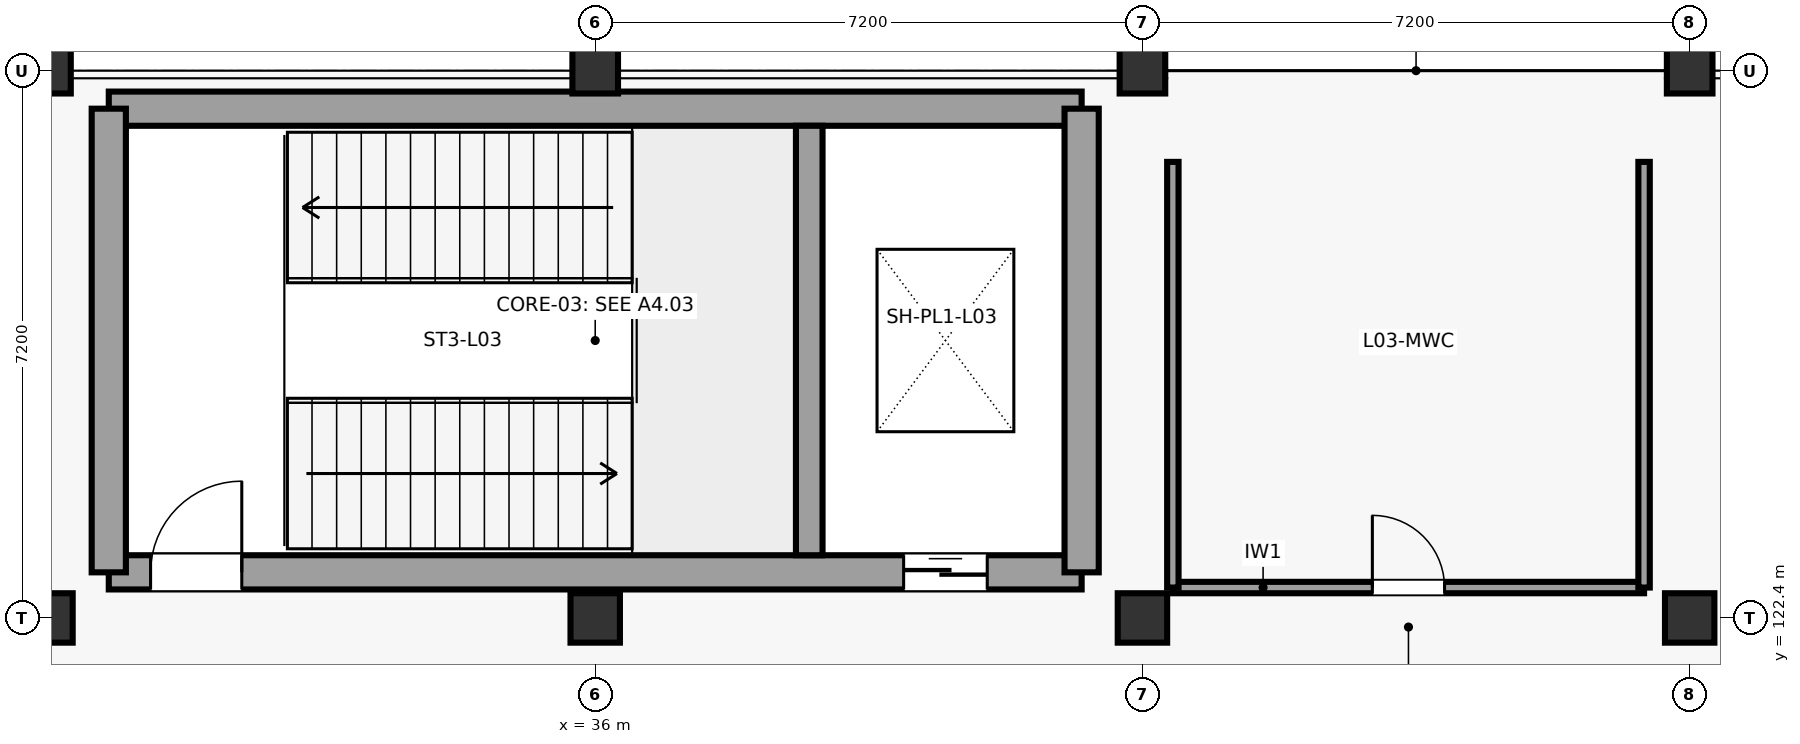
"""IFC4 building model, lengths in metres.
Left out: names, types, materials, properties, quantities, classifications, styles, units other than length and angle.
Written with IfcOpenShell. Run it as: python <this file> out.ifc"""

import sys

from ifc_helpers import new_model, si_unit, direction, frame, frame_2d, origin, origin_2d, place, context, subcontext, project, spatial, rectangle, extrude, element, fill, save


model = new_model("IFC4")
c1 = context("Model", 3, precision=1e-05, world=origin(), true_north=direction((0.0, 1.0)))
c2 = subcontext(c1, "Body", "Model", "MODEL_VIEW")
j1 = project(units=[si_unit("LENGTHUNIT", "METRE"), si_unit("PLANEANGLEUNIT", "RADIAN")], contexts=[c1])
p1 = place(None, origin())
s1 = spatial("IfcSite", under=j1, at=p1, CompositionType="ELEMENT")
p2 = place(p1, origin())
s2 = spatial("IfcBuilding", under=s1, at=p2, CompositionType="ELEMENT")
p3 = place(p2, frame((0.0, 0.0, 13.8)))
s3 = spatial("IfcBuildingStorey", under=s2, at=p3, CompositionType="ELEMENT", Elevation=13.8)
p4 = place(p3, frame((28.8, 122.4, 0.0), z_axis=(0.0, 0.0, 1.0), x_axis=(1.0, 0.0, 0.0)))
e1 = element("IfcColumn", 1, at=p4, inside=s3, PredefinedType="COLUMN", context=c2, shape_type="SweptSolid", body=[
    extrude(rectangle(XDim=0.65, YDim=0.65, at=origin_2d()), origin(), (0.0, 0.0, 1.0), 4.8),
])
p5 = place(p3, frame((28.8, 129.6, 0.0), z_axis=(0.0, 0.0, 1.0), x_axis=(1.0, 0.0, 0.0)))
e2 = element("IfcColumn", 2, at=p5, inside=s3, PredefinedType="COLUMN", context=c2, shape_type="SweptSolid", body=[
    extrude(rectangle(XDim=0.6, YDim=0.6, at=origin_2d()), origin(), (0.0, 0.0, 1.0), 4.8),
])
p6 = place(p3, frame((36.0, 122.4, 0.0), z_axis=(0.0, 0.0, 1.0), x_axis=(1.0, 0.0, 0.0)))
e3 = element("IfcColumn", 3, at=p6, inside=s3, PredefinedType="COLUMN", context=c2, shape_type="SweptSolid", body=[
    extrude(rectangle(XDim=0.65, YDim=0.65, at=origin_2d()), origin(), (0.0, 0.0, 1.0), 4.8),
])
p7 = place(p3, frame((36.0, 129.6, 0.0), z_axis=(0.0, 0.0, 1.0), x_axis=(1.0, 0.0, 0.0)))
e4 = element("IfcColumn", 4, at=p7, inside=s3, PredefinedType="COLUMN", context=c2, shape_type="SweptSolid", body=[
    extrude(rectangle(XDim=0.6, YDim=0.6, at=origin_2d()), origin(), (0.0, 0.0, 1.0), 4.8),
])
p8 = place(p3, frame((43.2, 122.4, 0.0), z_axis=(0.0, 0.0, 1.0), x_axis=(1.0, 0.0, 0.0)))
e5 = element("IfcColumn", 5, at=p8, inside=s3, PredefinedType="COLUMN", context=c2, shape_type="SweptSolid", body=[
    extrude(rectangle(XDim=0.65, YDim=0.65, at=origin_2d()), origin(), (0.0, 0.0, 1.0), 4.8),
])
p9 = place(p3, frame((43.2, 129.6, 0.0), z_axis=(0.0, 0.0, 1.0), x_axis=(1.0, 0.0, 0.0)))
e6 = element("IfcColumn", 6, at=p9, inside=s3, PredefinedType="COLUMN", context=c2, shape_type="SweptSolid", body=[
    extrude(rectangle(XDim=0.6, YDim=0.6, at=origin_2d()), origin(), (0.0, 0.0, 1.0), 4.8),
])
p10 = place(p3, frame((50.4, 122.4, 0.0), z_axis=(0.0, 0.0, 1.0), x_axis=(1.0, 0.0, 0.0)))
e7 = element("IfcColumn", 7, at=p10, inside=s3, PredefinedType="COLUMN", context=c2, shape_type="SweptSolid", body=[
    extrude(rectangle(XDim=0.65, YDim=0.65, at=origin_2d()), origin(), (0.0, 0.0, 1.0), 4.8),
])
p11 = place(p3, frame((50.4, 129.6, 0.0), z_axis=(0.0, 0.0, 1.0), x_axis=(1.0, 0.0, 0.0)))
e8 = element("IfcColumn", 8, at=p11, inside=s3, PredefinedType="COLUMN", context=c2, shape_type="SweptSolid", body=[
    extrude(rectangle(XDim=0.6, YDim=0.6, at=origin_2d()), origin(), (0.0, 0.0, 1.0), 4.8),
])
p12 = place(p3, frame((29.6, 123.0, 0.0), z_axis=(0.0, 0.0, 1.0), x_axis=(1.0, 0.0, 0.0)))
e9 = element("IfcWall", 9, at=p12, inside=s3, PredefinedType="SHEAR", context=c2, shape_type="SweptSolid", body=[
    extrude(rectangle(XDim=12.8, YDim=0.45, at=frame_2d((6.4, 0.0))), origin(), (0.0, 0.0, 1.0), 4.53),
])
p13 = place(p12, frame((0.55, 0.0, 0.0)))
e10 = element("IfcOpeningElement", 10, at=p13, cuts=e9, PredefinedType="OPENING", context=c2, shape_type="SweptSolid", body=[
    extrude(rectangle(XDim=1.2, YDim=2.25, at=frame_2d((0.6, 1.125))), frame((0.0, 0.235, 0.0), z_axis=(0.0, -1.0, 0.0), x_axis=(1.0, 0.0, 0.0)), (0.0, 0.0, 1.0), 0.47),
])
p14 = place(p12, frame((10.458, 0.0, 0.0)))
e11 = element("IfcOpeningElement", 11, at=p14, cuts=e9, PredefinedType="OPENING", context=c2, shape_type="SweptSolid", body=[
    extrude(rectangle(XDim=1.1, YDim=2.2, at=frame_2d((0.55, 1.1))), frame((0.0, 0.235, 0.0), z_axis=(0.0, -1.0, 0.0), x_axis=(1.0, 0.0, 0.0)), (0.0, 0.0, 1.0), 0.47),
])
p15 = place(p3, frame((29.6, 129.1, 0.0), z_axis=(0.0, 0.0, 1.0), x_axis=(1.0, 0.0, 0.0)))
e12 = element("IfcWall", 12, at=p15, inside=s3, PredefinedType="SHEAR", context=c2, shape_type="SweptSolid", body=[
    extrude(rectangle(XDim=12.8, YDim=0.45, at=frame_2d((6.4, 0.0))), origin(), (0.0, 0.0, 1.0), 4.53),
])
for number, where, z_axis, x_axis in (
    (13, (29.6, 123.0, 0.0), (0.0, 0.0, 1.0), (0.0, 1.0, 0.0)),
    (14, (42.4, 123.0, 0.0), (0.0, 0.0, 1.0), (0.0, 1.0, 0.0)),
):
    element("IfcWall", number, at=place(p3, frame(where, z_axis=z_axis, x_axis=x_axis)), inside=s3, PredefinedType="SHEAR", context=c2, shape_type="SweptSolid", body=[
        extrude(rectangle(XDim=6.1, YDim=0.45, at=frame_2d((3.05, 0.0))), origin(), (0.0, 0.0, 1.0), 4.53),
    ])
p16 = place(p3, frame((38.816, 123.225, 0.0), z_axis=(0.0, 0.0, 1.0), x_axis=(0.0, 1.0, 0.0)))
e15 = element("IfcWall", 15, at=p16, inside=s3, PredefinedType="SHEAR", context=c2, shape_type="SweptSolid", body=[
    extrude(rectangle(XDim=5.65, YDim=0.35, at=frame_2d((2.825, 0.0))), origin(), (0.0, 0.0, 1.0), 4.53),
])
p17 = place(p3, frame((43.6, 122.8, 0.0), z_axis=(0.0, 0.0, 1.0), x_axis=(1.0, 0.0, 0.0)))
e16 = element("IfcWall", 16, at=p17, inside=s3, PredefinedType="PARTITIONING", context=c2, shape_type="SweptSolid", body=[
    extrude(rectangle(XDim=6.2, YDim=0.15, at=frame_2d((3.1, 0.0))), origin(), (0.0, 0.0, 1.0), 3.59),
])
p18 = place(p17, frame((2.625, 0.0, 0.0)))
e17 = element("IfcOpeningElement", 17, at=p18, cuts=e16, PredefinedType="OPENING", context=c2, shape_type="SweptSolid", body=[
    extrude(rectangle(XDim=0.95, YDim=2.15, at=frame_2d((0.475, 1.075))), frame((0.0, 0.085, 0.0), z_axis=(0.0, -1.0, 0.0), x_axis=(1.0, 0.0, 0.0)), (0.0, 0.0, 1.0), 0.17),
])
for number, where, z_axis, x_axis in (
    (18, (49.8, 122.8, 0.0), (0.0, 0.0, 1.0), (0.0, 1.0, 0.0)),
    (19, (43.6, 128.4, 0.0), (0.0, 0.0, 1.0), (0.0, -1.0, 0.0)),
):
    element("IfcWall", number, at=place(p3, frame(where, z_axis=z_axis, x_axis=x_axis)), inside=s3, PredefinedType="PARTITIONING", context=c2, shape_type="SweptSolid", body=[
        extrude(rectangle(XDim=5.6, YDim=0.15, at=frame_2d((2.8, 0.0))), origin(), (0.0, 0.0, 1.0), 3.59),
    ])
p19 = place(p13, origin())
e20 = element("IfcDoor", 20, at=p19, inside=s3, OperationType="SINGLE_SWING_RIGHT", PredefinedType="DOOR", context=c2, shape_type="SweptSolid", body=[
    extrude(rectangle(XDim=1.2, YDim=2.25, at=frame_2d((0.6, 1.125))), frame((0.0, 0.025, 0.0), z_axis=(0.0, -1.0, 0.0), x_axis=(1.0, 0.0, 0.0)), (0.0, 0.0, 1.0), 0.05),
])
fill(e10, e20)
p20 = place(p14, origin())
e21 = element("IfcDoor", 21, at=p20, inside=s3, OperationType="SLIDING_TO_LEFT", PredefinedType="DOOR", context=c2, shape_type="SweptSolid", body=[
    extrude(rectangle(XDim=1.1, YDim=2.2, at=frame_2d((0.55, 1.1))), frame((0.0, 0.025, 0.0), z_axis=(0.0, -1.0, 0.0), x_axis=(1.0, 0.0, 0.0)), (0.0, 0.0, 1.0), 0.05),
])
fill(e11, e21)
p21 = place(p18, origin())
e22 = element("IfcDoor", 22, at=p21, inside=s3, OperationType="SINGLE_SWING_LEFT", PredefinedType="DOOR", context=c2, shape_type="SweptSolid", body=[
    extrude(rectangle(XDim=0.95, YDim=2.15, at=frame_2d((0.475, 1.075))), frame((0.0, 0.025, 0.0), z_axis=(0.0, -1.0, 0.0), x_axis=(1.0, 0.0, 0.0)), (0.0, 0.0, 1.0), 0.05),
])
fill(e17, e22)
save(model, sys.argv[1])
